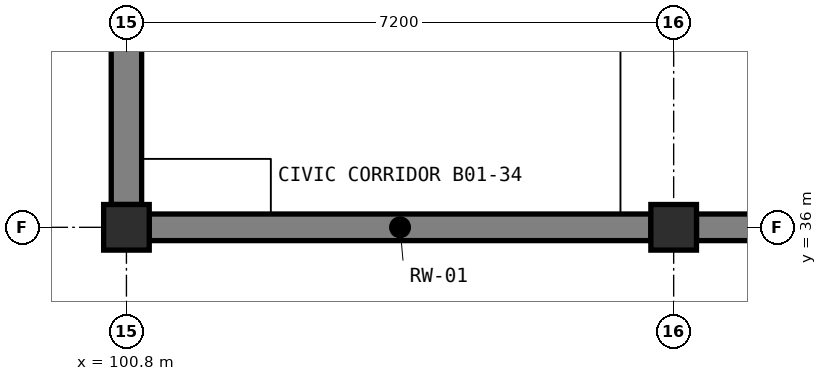
"""IFC4 building model, lengths in metres.
Left out: names, types, materials, properties, quantities, classifications, styles, units other than length and angle.
Written with IfcOpenShell. Run it as: python <this file> out.ifc"""

import sys

from ifc_helpers import new_model, si_unit, direction, frame, frame_2d, origin, origin_2d, place, context, subcontext, project, spatial, rectangle, extrude, element, save


model = new_model("IFC4")
c1 = context("Model", 3, precision=1e-05, world=origin(), true_north=direction((0.0, 1.0)))
c2 = subcontext(c1, "Body", "Model", "MODEL_VIEW")
j1 = project(units=[si_unit("LENGTHUNIT", "METRE"), si_unit("PLANEANGLEUNIT", "RADIAN")], contexts=[c1])
p1 = place(None, origin())
s1 = spatial("IfcSite", under=j1, at=p1, CompositionType="ELEMENT")
p2 = place(p1, origin())
s2 = spatial("IfcBuilding", under=s1, at=p2, CompositionType="ELEMENT")
p3 = place(p2, frame((0.0, 0.0, -4.2)))
s3 = spatial("IfcBuildingStorey", under=s2, at=p3, CompositionType="ELEMENT", Elevation=-4.2)
p4 = place(p3, frame((101.1, 36.0, 0.0), z_axis=(0.0, 0.0, 1.0), x_axis=(1.0, 0.0, 0.0)))
e1 = element("IfcWall", 1, at=p4, inside=s3, PredefinedType="USERDEFINED", context=c2, shape_type="SweptSolid", body=[
    extrude(rectangle(XDim=6.6, YDim=0.35, at=frame_2d((3.3, 0.0))), origin(), (0.0, 0.0, 1.0), 3.98),
])
p5 = place(p3, frame((100.8, 36.3, 0.0), z_axis=(0.0, 0.0, 1.0), x_axis=(0.0, 1.0, 0.0)))
e2 = element("IfcWall", 2, at=p5, inside=s3, PredefinedType="USERDEFINED", context=c2, shape_type="SweptSolid", body=[
    extrude(rectangle(XDim=6.6, YDim=0.4, at=frame_2d((3.3, 0.0))), origin(), (0.0, 0.0, 1.0), 3.98),
])
p6 = place(p3, frame((108.3, 36.0, 0.0), z_axis=(0.0, 0.0, 1.0), x_axis=(1.0, 0.0, 0.0)))
e3 = element("IfcWall", 3, at=p6, inside=s3, PredefinedType="USERDEFINED", context=c2, shape_type="SweptSolid", body=[
    extrude(rectangle(XDim=1.01, YDim=0.35, at=frame_2d((0.505, 0.0))), origin(), (0.0, 0.0, 1.0), 3.98),
])
for number, where, z_axis, x_axis in (
    (4, (100.8, 36.0, 0.0), (0.0, 0.0, 1.0), (1.0, 0.0, 0.0)),
    (5, (108.0, 36.0, 0.0), (0.0, 0.0, 1.0), (1.0, 0.0, 0.0)),
):
    element("IfcColumn", number, at=place(p3, frame(where, z_axis=z_axis, x_axis=x_axis)), inside=s3, PredefinedType="COLUMN", context=c2, shape_type="SweptSolid", body=[
        extrude(rectangle(XDim=0.6, YDim=0.6, at=origin_2d()), origin(), (0.0, 0.0, 1.0), 4.2),
    ])
save(model, sys.argv[1])
